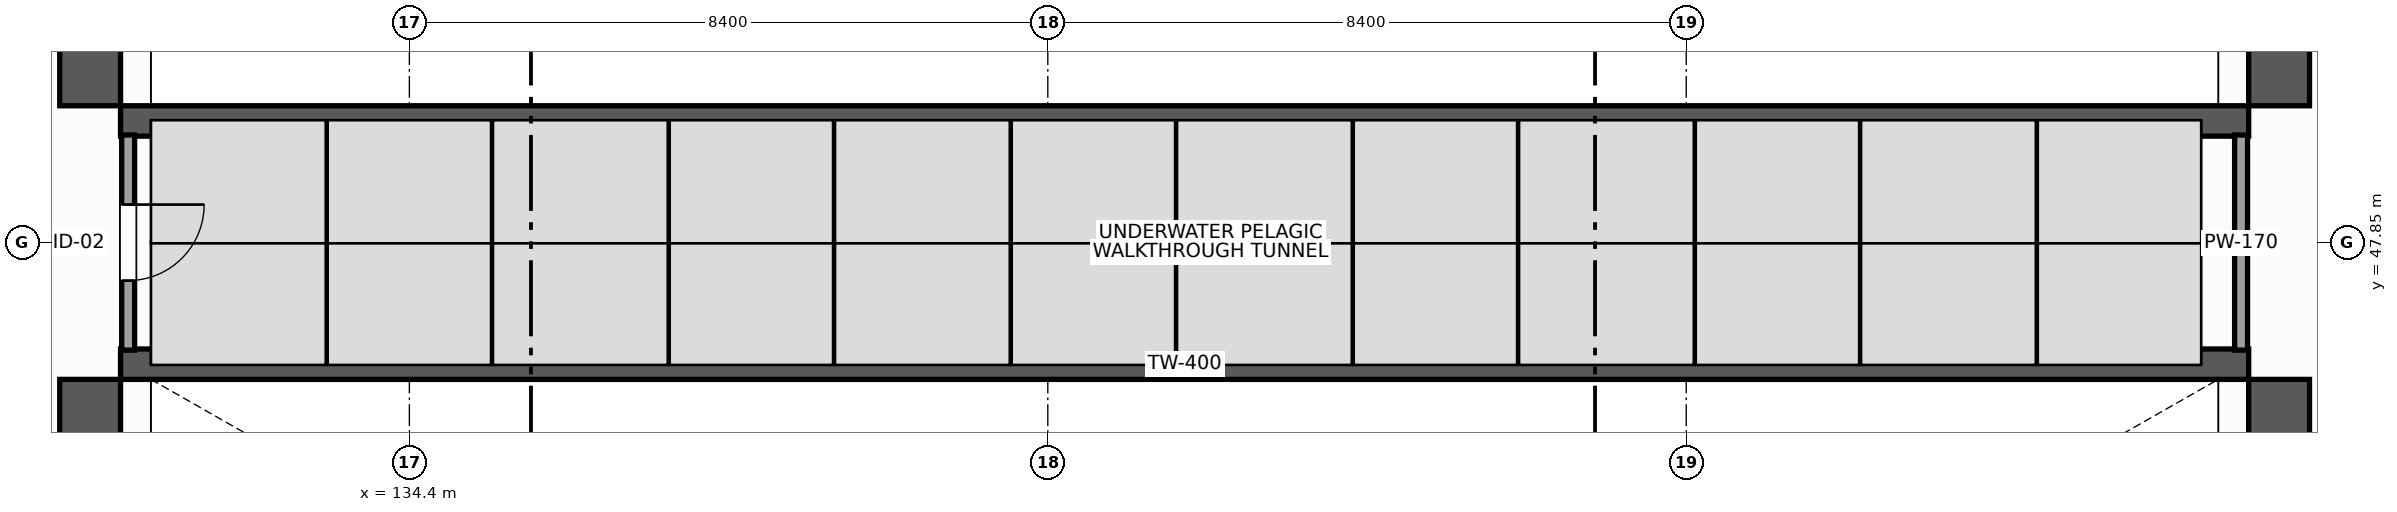
"""IFC4 building model, lengths in metres.
Left out: names, types, materials, properties, quantities, classifications, styles, units other than length and angle.
Written with IfcOpenShell. Run it as: python <this file> out.ifc"""

import sys

from ifc_helpers import new_model, si_unit, direction, frame, frame_2d, origin, place, context, subcontext, project, spatial, rectangle, extrude, element, fill, save


model = new_model("IFC4")
c1 = context("Model", 3, precision=1e-05, world=origin(), true_north=direction((0.0, 1.0)))
c2 = subcontext(c1, "Body", "Model", "MODEL_VIEW")
j1 = project(units=[si_unit("LENGTHUNIT", "METRE"), si_unit("PLANEANGLEUNIT", "RADIAN")], contexts=[c1])
p1 = place(None, origin())
s1 = spatial("IfcSite", under=j1, at=p1, CompositionType="ELEMENT")
p2 = place(p1, origin())
s2 = spatial("IfcBuilding", under=s1, at=p2, CompositionType="ELEMENT")
p3 = place(p2, origin())
s3 = spatial("IfcBuildingStorey", under=s2, at=p3, CompositionType="ELEMENT", Elevation=0.0)
p4 = place(p3, frame((130.2, 30.15, 0.0), z_axis=(0.0, 0.0, 1.0), x_axis=(0.0, 1.0, 0.0)))
e1 = element("IfcWall", 1, at=p4, inside=s3, PredefinedType="SOLIDWALL", context=c2, shape_type="SweptSolid", body=[
    extrude(rectangle(XDim=15.9, YDim=0.8, at=frame_2d((7.95, 0.0))), origin(), (0.0, 0.0, 1.0), 5.09),
])
p5 = place(p4, frame((6.15, 0.0, 0.75)))
e2 = element("IfcOpeningElement", 2, at=p5, cuts=e1, PredefinedType="OPENING", context=c2, shape_type="SweptSolid", body=[
    extrude(rectangle(XDim=3.6, YDim=2.8, at=frame_2d((1.8, 1.4))), frame((0.0, 0.41, 0.0), z_axis=(0.0, -1.0, 0.0), x_axis=(1.0, 0.0, 0.0)), (0.0, 0.0, 1.0), 0.82),
])
p6 = place(p3, frame((130.2, 49.65, 0.0), z_axis=(0.0, 0.0, 1.0), x_axis=(0.0, 1.0, 0.0)))
e3 = element("IfcWall", 3, at=p6, inside=s3, PredefinedType="SOLIDWALL", context=c2, shape_type="SweptSolid", body=[
    extrude(rectangle(XDim=15.9, YDim=0.8, at=frame_2d((7.95, 0.0))), origin(), (0.0, 0.0, 1.0), 5.09),
])
p7 = place(p6, frame((6.15, 0.0, 0.75)))
e4 = element("IfcOpeningElement", 4, at=p7, cuts=e3, PredefinedType="OPENING", context=c2, shape_type="SweptSolid", body=[
    extrude(rectangle(XDim=3.6, YDim=2.8, at=frame_2d((1.8, 1.4))), frame((0.0, 0.41, 0.0), z_axis=(0.0, -1.0, 0.0), x_axis=(1.0, 0.0, 0.0)), (0.0, 0.0, 1.0), 0.82),
])
p8 = place(p3, frame((159.0, 30.15, 0.0), z_axis=(0.0, 0.0, 1.0), x_axis=(0.0, 1.0, 0.0)))
e5 = element("IfcWall", 5, at=p8, inside=s3, PredefinedType="SOLIDWALL", context=c2, shape_type="SweptSolid", body=[
    extrude(rectangle(XDim=15.9, YDim=0.8, at=frame_2d((7.95, 0.0))), origin(), (0.0, 0.0, 1.0), 5.09),
])
p9 = place(p8, frame((6.15, 0.0, 0.75)))
e6 = element("IfcOpeningElement", 6, at=p9, cuts=e5, PredefinedType="OPENING", context=c2, shape_type="SweptSolid", body=[
    extrude(rectangle(XDim=3.6, YDim=2.8, at=frame_2d((1.8, 1.4))), frame((0.0, 0.41, 0.0), z_axis=(0.0, -1.0, 0.0), x_axis=(1.0, 0.0, 0.0)), (0.0, 0.0, 1.0), 0.82),
])
p10 = place(p3, frame((159.0, 49.65, 0.0), z_axis=(0.0, 0.0, 1.0), x_axis=(0.0, 1.0, 0.0)))
e7 = element("IfcWall", 7, at=p10, inside=s3, PredefinedType="SOLIDWALL", context=c2, shape_type="SweptSolid", body=[
    extrude(rectangle(XDim=15.9, YDim=0.8, at=frame_2d((7.95, 0.0))), origin(), (0.0, 0.0, 1.0), 5.09),
])
p11 = place(p10, frame((6.15, 0.0, 0.75)))
e8 = element("IfcOpeningElement", 8, at=p11, cuts=e7, PredefinedType="OPENING", context=c2, shape_type="SweptSolid", body=[
    extrude(rectangle(XDim=3.6, YDim=2.8, at=frame_2d((1.8, 1.4))), frame((0.0, 0.41, 0.0), z_axis=(0.0, -1.0, 0.0), x_axis=(1.0, 0.0, 0.0)), (0.0, 0.0, 1.0), 0.82),
])
for number, where, z_axis, x_axis in (
    (9, (130.6, 46.25, 0.0), (0.0, 0.0, 1.0), (1.0, 0.0, 0.0)),
    (10, (130.6, 49.45, 0.0), (0.0, 0.0, 1.0), (1.0, 0.0, 0.0)),
):
    element("IfcWall", number, at=place(p3, frame(where, z_axis=z_axis, x_axis=x_axis)), inside=s3, PredefinedType="SOLIDWALL", context=c2, shape_type="SweptSolid", body=[
        extrude(rectangle(XDim=28.0, YDim=0.4, at=frame_2d((14.0, 0.0))), origin(), (0.0, 0.0, 1.0), 1.12),
    ])
p12 = place(p3, frame((130.7, 46.435, 0.0), z_axis=(0.0, 0.0, 1.0), x_axis=(0.0, 1.0, 0.0)))
e11 = element("IfcWall", 11, at=p12, inside=s3, PredefinedType="PARTITIONING", context=c2, shape_type="SweptSolid", body=[
    extrude(rectangle(XDim=2.83, YDim=0.17, at=frame_2d((1.415, 0.0))), origin(), (0.0, 0.0, 1.0), 2.4),
])
p13 = place(p12, frame((0.915, 0.0, 0.0)))
e12 = element("IfcOpeningElement", 12, at=p13, cuts=e11, PredefinedType="OPENING", context=c2, shape_type="SweptSolid", body=[
    extrude(rectangle(XDim=1.0, YDim=2.15, at=frame_2d((0.5, 1.075))), frame((0.0, 0.095, 0.0), z_axis=(0.0, -1.0, 0.0), x_axis=(1.0, 0.0, 0.0)), (0.0, 0.0, 1.0), 0.19),
])
p14 = place(p3, frame((158.5, 46.435, 0.0), z_axis=(0.0, 0.0, 1.0), x_axis=(0.0, 1.0, 0.0)))
e13 = element("IfcWall", 13, at=p14, inside=s3, PredefinedType="PARTITIONING", context=c2, shape_type="SweptSolid", body=[
    extrude(rectangle(XDim=2.83, YDim=0.17, at=frame_2d((1.415, 0.0))), origin(), (0.0, 0.0, 1.0), 2.4),
])
p15 = place(p13, frame((1.0, 0.0, 0.0), z_axis=(0.0, 0.0, 1.0), x_axis=(-1.0, 0.0, 0.0)))
e14 = element("IfcDoor", 14, at=p15, inside=s3, OperationType="SINGLE_SWING_LEFT", PredefinedType="DOOR", context=c2, shape_type="SweptSolid", body=[
    extrude(rectangle(XDim=1.0, YDim=2.15, at=frame_2d((0.5, 1.075))), frame((0.0, 0.025, 0.0), z_axis=(0.0, -1.0, 0.0), x_axis=(1.0, 0.0, 0.0)), (0.0, 0.0, 1.0), 0.05),
])
fill(e12, e14)
save(model, sys.argv[1])
